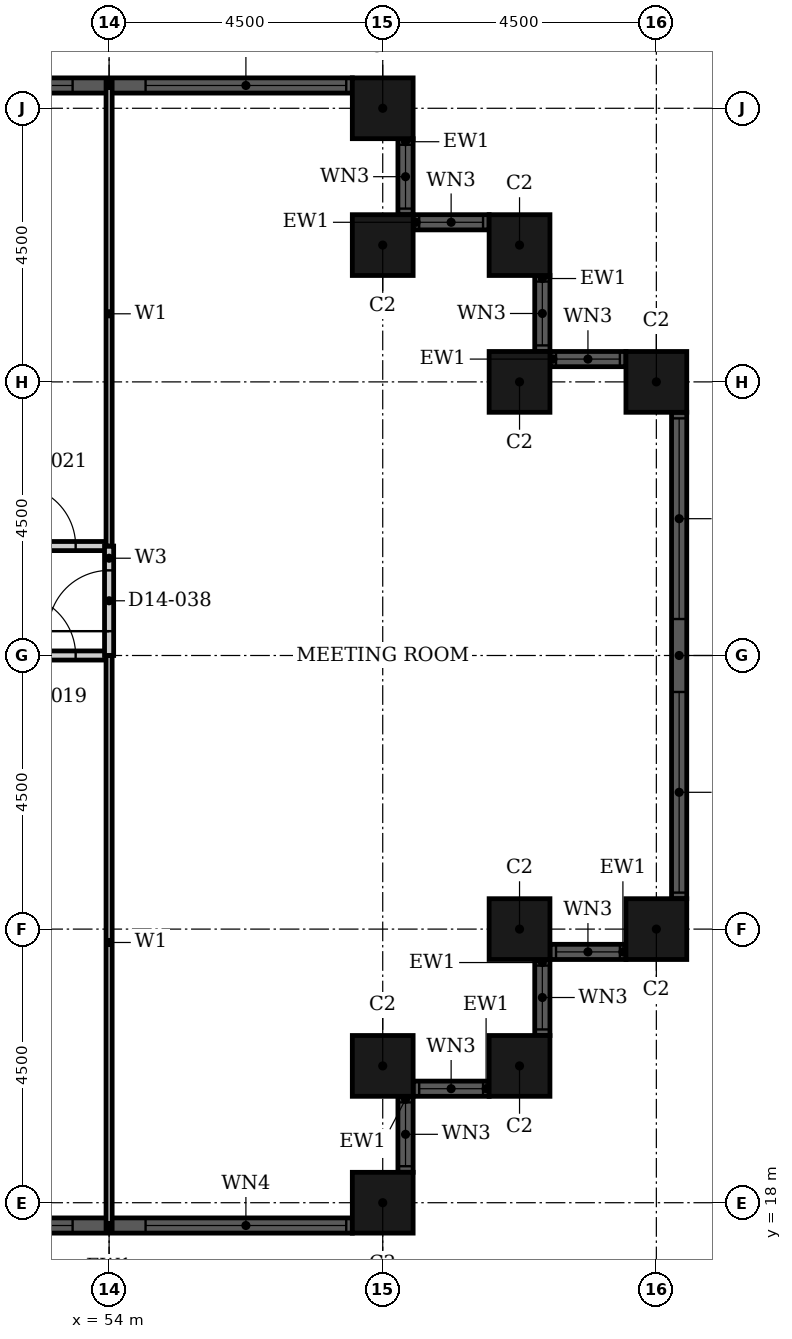
"""IFC4 building model, lengths in metres.
Left out: names, types, materials, properties, quantities, classifications, styles, units other than length and angle.
Written with IfcOpenShell. Run it as: python <this file> out.ifc"""

import sys

from ifc_helpers import new_model, si_unit, direction, frame, frame_2d, origin, origin_2d, place, context, subcontext, project, spatial, rectangle, hollow_rectangle, extrude, element, fill, save


model = new_model("IFC4")
c1 = context("Model", 3, precision=1e-05, world=origin(), true_north=direction((0.0, 1.0)))
c2 = subcontext(c1, "Body", "Model", "MODEL_VIEW")
j1 = project(units=[si_unit("LENGTHUNIT", "METRE"), si_unit("PLANEANGLEUNIT", "RADIAN")], contexts=[c1])
p1 = place(None, origin())
s1 = spatial("IfcSite", under=j1, at=p1, CompositionType="ELEMENT")
p2 = place(p1, origin())
s2 = spatial("IfcBuilding", under=s1, at=p2, CompositionType="ELEMENT")
p3 = place(p2, frame((0.0, 0.0, 63.6)))
s3 = spatial("IfcBuildingStorey", under=s2, at=p3, CompositionType="ELEMENT", Elevation=63.6)
for number, where, z_axis, x_axis in (
    (1, (58.5, 18.0, 0.0), (0.0, 0.0, 1.0), (1.0, 0.0, 0.0)),
    (2, (58.5, 20.25, 0.0), (0.0, 0.0, 1.0), (1.0, 0.0, 0.0)),
    (3, (60.75, 20.25, 0.0), (0.0, 0.0, 1.0), (1.0, 0.0, 0.0)),
    (4, (60.75, 22.5, 0.0), (0.0, 0.0, 1.0), (1.0, 0.0, 0.0)),
    (5, (63.0, 22.5, 0.0), (0.0, 0.0, 1.0), (1.0, 0.0, 0.0)),
    (6, (63.0, 31.5, 0.0), (0.0, 0.0, 1.0), (1.0, 0.0, 0.0)),
    (7, (60.75, 31.5, 0.0), (0.0, 0.0, 1.0), (1.0, 0.0, 0.0)),
    (8, (60.75, 33.75, 0.0), (0.0, 0.0, 1.0), (1.0, 0.0, 0.0)),
    (9, (58.5, 33.75, 0.0), (0.0, 0.0, 1.0), (1.0, 0.0, 0.0)),
    (10, (58.5, 36.0, 0.0), (0.0, 0.0, 1.0), (1.0, 0.0, 0.0)),
):
    element("IfcColumn", number, at=place(p3, frame(where, z_axis=z_axis, x_axis=x_axis)), inside=s3, PredefinedType="COLUMN", context=c2, shape_type="SweptSolid", body=[
        extrude(hollow_rectangle(XDim=1.0, YDim=1.0, WallThickness=0.032, at=origin_2d()), origin(), (0.0, 0.0, 1.0), 3.6),
    ])
p4 = place(p3, frame((50.0, 17.625, 0.0), z_axis=(0.0, 0.0, 1.0), x_axis=(1.0, 0.0, 0.0)))
e11 = element("IfcWall", 11, at=p4, inside=s3, PredefinedType="SOLIDWALL", context=c2, shape_type="SweptSolid", body=[
    extrude(rectangle(XDim=8.0, YDim=0.25, at=frame_2d((4.0, 0.0))), origin(), (0.0, 0.0, 1.0), 3.6),
])
p5 = place(p4, frame((0.1, 0.0, 0.9)))
e12 = element("IfcOpeningElement", 12, at=p5, cuts=e11, PredefinedType="OPENING", context=c2, shape_type="SweptSolid", body=[
    extrude(rectangle(XDim=3.3, YDim=2.08, at=frame_2d((1.65, 1.04))), frame((0.0, 0.135, 0.0), z_axis=(0.0, -1.0, 0.0), x_axis=(1.0, 0.0, 0.0)), (0.0, 0.0, 1.0), 0.27),
])
p6 = place(p4, frame((4.6, 0.0, 0.9)))
e13 = element("IfcOpeningElement", 13, at=p6, cuts=e11, PredefinedType="OPENING", context=c2, shape_type="SweptSolid", body=[
    extrude(rectangle(XDim=3.3, YDim=2.08, at=frame_2d((1.65, 1.04))), frame((0.0, 0.135, 0.0), z_axis=(0.0, -1.0, 0.0), x_axis=(1.0, 0.0, 0.0)), (0.0, 0.0, 1.0), 0.27),
])
p7 = place(p3, frame((58.875, 18.5, 0.0), z_axis=(0.0, 0.0, 1.0), x_axis=(0.0, 1.0, 0.0)))
e14 = element("IfcWall", 14, at=p7, inside=s3, PredefinedType="SOLIDWALL", context=c2, shape_type="SweptSolid", body=[
    extrude(rectangle(XDim=1.25, YDim=0.25, at=frame_2d((0.625, 0.0))), origin(), (0.0, 0.0, 1.0), 3.6),
])
p8 = place(p7, frame((0.1, 0.0, 0.9)))
e15 = element("IfcOpeningElement", 15, at=p8, cuts=e14, PredefinedType="OPENING", context=c2, shape_type="SweptSolid", body=[
    extrude(rectangle(XDim=1.05, YDim=2.08, at=frame_2d((0.525, 1.04))), frame((0.0, 0.135, 0.0), z_axis=(0.0, -1.0, 0.0), x_axis=(1.0, 0.0, 0.0)), (0.0, 0.0, 1.0), 0.27),
])
p9 = place(p3, frame((59.0, 19.875, 0.0), z_axis=(0.0, 0.0, 1.0), x_axis=(1.0, 0.0, 0.0)))
e16 = element("IfcWall", 16, at=p9, inside=s3, PredefinedType="SOLIDWALL", context=c2, shape_type="SweptSolid", body=[
    extrude(rectangle(XDim=1.25, YDim=0.25, at=frame_2d((0.625, 0.0))), origin(), (0.0, 0.0, 1.0), 3.6),
])
p10 = place(p9, frame((0.1, 0.0, 0.9)))
e17 = element("IfcOpeningElement", 17, at=p10, cuts=e16, PredefinedType="OPENING", context=c2, shape_type="SweptSolid", body=[
    extrude(rectangle(XDim=1.05, YDim=2.08, at=frame_2d((0.525, 1.04))), frame((0.0, 0.135, 0.0), z_axis=(0.0, -1.0, 0.0), x_axis=(1.0, 0.0, 0.0)), (0.0, 0.0, 1.0), 0.27),
])
p11 = place(p3, frame((61.125, 20.75, 0.0), z_axis=(0.0, 0.0, 1.0), x_axis=(0.0, 1.0, 0.0)))
e18 = element("IfcWall", 18, at=p11, inside=s3, PredefinedType="SOLIDWALL", context=c2, shape_type="SweptSolid", body=[
    extrude(rectangle(XDim=1.25, YDim=0.25, at=frame_2d((0.625, 0.0))), origin(), (0.0, 0.0, 1.0), 3.6),
])
p12 = place(p11, frame((0.1, 0.0, 0.9)))
e19 = element("IfcOpeningElement", 19, at=p12, cuts=e18, PredefinedType="OPENING", context=c2, shape_type="SweptSolid", body=[
    extrude(rectangle(XDim=1.05, YDim=2.08, at=frame_2d((0.525, 1.04))), frame((0.0, 0.135, 0.0), z_axis=(0.0, -1.0, 0.0), x_axis=(1.0, 0.0, 0.0)), (0.0, 0.0, 1.0), 0.27),
])
p13 = place(p3, frame((61.25, 22.125, 0.0), z_axis=(0.0, 0.0, 1.0), x_axis=(1.0, 0.0, 0.0)))
e20 = element("IfcWall", 20, at=p13, inside=s3, PredefinedType="SOLIDWALL", context=c2, shape_type="SweptSolid", body=[
    extrude(rectangle(XDim=1.25, YDim=0.25, at=frame_2d((0.625, 0.0))), origin(), (0.0, 0.0, 1.0), 3.6),
])
p14 = place(p13, frame((0.1, 0.0, 0.9)))
e21 = element("IfcOpeningElement", 21, at=p14, cuts=e20, PredefinedType="OPENING", context=c2, shape_type="SweptSolid", body=[
    extrude(rectangle(XDim=1.05, YDim=2.08, at=frame_2d((0.525, 1.04))), frame((0.0, 0.135, 0.0), z_axis=(0.0, -1.0, 0.0), x_axis=(1.0, 0.0, 0.0)), (0.0, 0.0, 1.0), 0.27),
])
p15 = place(p3, frame((63.375, 23.0, 0.0), z_axis=(0.0, 0.0, 1.0), x_axis=(0.0, 1.0, 0.0)))
e22 = element("IfcWall", 22, at=p15, inside=s3, PredefinedType="SOLIDWALL", context=c2, shape_type="SweptSolid", body=[
    extrude(rectangle(XDim=8.0, YDim=0.25, at=frame_2d((4.0, 0.0))), origin(), (0.0, 0.0, 1.0), 3.6),
])
p16 = place(p15, frame((0.1, 0.0, 0.9)))
e23 = element("IfcOpeningElement", 23, at=p16, cuts=e22, PredefinedType="OPENING", context=c2, shape_type="SweptSolid", body=[
    extrude(rectangle(XDim=3.3, YDim=2.08, at=frame_2d((1.65, 1.04))), frame((0.0, 0.135, 0.0), z_axis=(0.0, -1.0, 0.0), x_axis=(1.0, 0.0, 0.0)), (0.0, 0.0, 1.0), 0.27),
])
p17 = place(p15, frame((4.6, 0.0, 0.9)))
e24 = element("IfcOpeningElement", 24, at=p17, cuts=e22, PredefinedType="OPENING", context=c2, shape_type="SweptSolid", body=[
    extrude(rectangle(XDim=3.3, YDim=2.08, at=frame_2d((1.65, 1.04))), frame((0.0, 0.135, 0.0), z_axis=(0.0, -1.0, 0.0), x_axis=(1.0, 0.0, 0.0)), (0.0, 0.0, 1.0), 0.27),
])
p18 = place(p3, frame((62.5, 31.875, 0.0), z_axis=(0.0, 0.0, 1.0), x_axis=(-1.0, 0.0, 0.0)))
e25 = element("IfcWall", 25, at=p18, inside=s3, PredefinedType="SOLIDWALL", context=c2, shape_type="SweptSolid", body=[
    extrude(rectangle(XDim=1.25, YDim=0.25, at=frame_2d((0.625, 0.0))), origin(), (0.0, 0.0, 1.0), 3.6),
])
p19 = place(p18, frame((0.1, 0.0, 0.9)))
e26 = element("IfcOpeningElement", 26, at=p19, cuts=e25, PredefinedType="OPENING", context=c2, shape_type="SweptSolid", body=[
    extrude(rectangle(XDim=1.05, YDim=2.08, at=frame_2d((0.525, 1.04))), frame((0.0, 0.135, 0.0), z_axis=(0.0, -1.0, 0.0), x_axis=(1.0, 0.0, 0.0)), (0.0, 0.0, 1.0), 0.27),
])
p20 = place(p3, frame((61.125, 32.0, 0.0), z_axis=(0.0, 0.0, 1.0), x_axis=(0.0, 1.0, 0.0)))
e27 = element("IfcWall", 27, at=p20, inside=s3, PredefinedType="SOLIDWALL", context=c2, shape_type="SweptSolid", body=[
    extrude(rectangle(XDim=1.25, YDim=0.25, at=frame_2d((0.625, 0.0))), origin(), (0.0, 0.0, 1.0), 3.6),
])
p21 = place(p20, frame((0.1, 0.0, 0.9)))
e28 = element("IfcOpeningElement", 28, at=p21, cuts=e27, PredefinedType="OPENING", context=c2, shape_type="SweptSolid", body=[
    extrude(rectangle(XDim=1.05, YDim=2.08, at=frame_2d((0.525, 1.04))), frame((0.0, 0.135, 0.0), z_axis=(0.0, -1.0, 0.0), x_axis=(1.0, 0.0, 0.0)), (0.0, 0.0, 1.0), 0.27),
])
p22 = place(p3, frame((60.25, 34.125, 0.0), z_axis=(0.0, 0.0, 1.0), x_axis=(-1.0, 0.0, 0.0)))
e29 = element("IfcWall", 29, at=p22, inside=s3, PredefinedType="SOLIDWALL", context=c2, shape_type="SweptSolid", body=[
    extrude(rectangle(XDim=1.25, YDim=0.25, at=frame_2d((0.625, 0.0))), origin(), (0.0, 0.0, 1.0), 3.6),
])
p23 = place(p22, frame((0.1, 0.0, 0.9)))
e30 = element("IfcOpeningElement", 30, at=p23, cuts=e29, PredefinedType="OPENING", context=c2, shape_type="SweptSolid", body=[
    extrude(rectangle(XDim=1.05, YDim=2.08, at=frame_2d((0.525, 1.04))), frame((0.0, 0.135, 0.0), z_axis=(0.0, -1.0, 0.0), x_axis=(1.0, 0.0, 0.0)), (0.0, 0.0, 1.0), 0.27),
])
p24 = place(p3, frame((58.875, 34.25, 0.0), z_axis=(0.0, 0.0, 1.0), x_axis=(0.0, 1.0, 0.0)))
e31 = element("IfcWall", 31, at=p24, inside=s3, PredefinedType="SOLIDWALL", context=c2, shape_type="SweptSolid", body=[
    extrude(rectangle(XDim=1.25, YDim=0.25, at=frame_2d((0.625, 0.0))), origin(), (0.0, 0.0, 1.0), 3.6),
])
p25 = place(p24, frame((0.1, 0.0, 0.9)))
e32 = element("IfcOpeningElement", 32, at=p25, cuts=e31, PredefinedType="OPENING", context=c2, shape_type="SweptSolid", body=[
    extrude(rectangle(XDim=1.05, YDim=2.08, at=frame_2d((0.525, 1.04))), frame((0.0, 0.135, 0.0), z_axis=(0.0, -1.0, 0.0), x_axis=(1.0, 0.0, 0.0)), (0.0, 0.0, 1.0), 0.27),
])
p26 = place(p3, frame((58.0, 36.375, 0.0), z_axis=(0.0, 0.0, 1.0), x_axis=(-1.0, 0.0, 0.0)))
e33 = element("IfcWall", 33, at=p26, inside=s3, PredefinedType="SOLIDWALL", context=c2, shape_type="SweptSolid", body=[
    extrude(rectangle(XDim=8.0, YDim=0.25, at=frame_2d((4.0, 0.0))), origin(), (0.0, 0.0, 1.0), 3.6),
])
p27 = place(p26, frame((0.1, 0.0, 0.9)))
e34 = element("IfcOpeningElement", 34, at=p27, cuts=e33, PredefinedType="OPENING", context=c2, shape_type="SweptSolid", body=[
    extrude(rectangle(XDim=3.3, YDim=2.08, at=frame_2d((1.65, 1.04))), frame((0.0, 0.135, 0.0), z_axis=(0.0, -1.0, 0.0), x_axis=(1.0, 0.0, 0.0)), (0.0, 0.0, 1.0), 0.27),
])
p28 = place(p26, frame((4.6, 0.0, 0.9)))
e35 = element("IfcOpeningElement", 35, at=p28, cuts=e33, PredefinedType="OPENING", context=c2, shape_type="SweptSolid", body=[
    extrude(rectangle(XDim=3.3, YDim=2.08, at=frame_2d((1.65, 1.04))), frame((0.0, 0.135, 0.0), z_axis=(0.0, -1.0, 0.0), x_axis=(1.0, 0.0, 0.0)), (0.0, 0.0, 1.0), 0.27),
])
p29 = place(p3, frame((46.8, 27.0, 0.0), z_axis=(0.0, 0.0, 1.0), x_axis=(1.0, 0.0, 0.0)))
e36 = element("IfcWall", 36, at=p29, inside=s3, PredefinedType="PARTITIONING", context=c2, shape_type="SweptSolid", body=[
    extrude(rectangle(XDim=7.2, YDim=0.15, at=frame_2d((3.6, 0.0))), origin(), (0.0, 0.0, 1.0), 2.58),
])
p30 = place(p29, frame((5.65, 0.0, 0.0)))
e37 = element("IfcOpeningElement", 37, at=p30, cuts=e36, PredefinedType="OPENING", context=c2, shape_type="SweptSolid", body=[
    extrude(rectangle(XDim=1.0, YDim=2.1, at=frame_2d((0.5, 1.05))), frame((0.0, 0.085, 0.0), z_axis=(0.0, -1.0, 0.0), x_axis=(1.0, 0.0, 0.0)), (0.0, 0.0, 1.0), 0.17),
])
p31 = place(p3, frame((46.8, 28.8, 0.0), z_axis=(0.0, 0.0, 1.0), x_axis=(1.0, 0.0, 0.0)))
e38 = element("IfcWall", 38, at=p31, inside=s3, PredefinedType="PARTITIONING", context=c2, shape_type="SweptSolid", body=[
    extrude(rectangle(XDim=7.2, YDim=0.15, at=frame_2d((3.6, 0.0))), origin(), (0.0, 0.0, 1.0), 3.3),
])
p32 = place(p31, frame((5.65, 0.0, 0.0)))
e39 = element("IfcOpeningElement", 39, at=p32, cuts=e38, PredefinedType="OPENING", context=c2, shape_type="SweptSolid", body=[
    extrude(rectangle(XDim=1.0, YDim=2.1, at=frame_2d((0.5, 1.05))), frame((0.0, 0.085, 0.0), z_axis=(0.0, -1.0, 0.0), x_axis=(1.0, 0.0, 0.0)), (0.0, 0.0, 1.0), 0.17),
])
p33 = place(p3, frame((54.0, 27.0, 0.0), z_axis=(0.0, 0.0, 1.0), x_axis=(0.0, 1.0, 0.0)))
e40 = element("IfcWall", 40, at=p33, inside=s3, PredefinedType="PARTITIONING", context=c2, shape_type="SweptSolid", body=[
    extrude(rectangle(XDim=1.8, YDim=0.15, at=frame_2d((0.9, 0.0))), origin(), (0.0, 0.0, 1.0), 3.3),
])
p34 = place(p33, frame((0.4, 0.0, 0.0)))
e41 = element("IfcOpeningElement", 41, at=p34, cuts=e40, PredefinedType="OPENING", context=c2, shape_type="SweptSolid", body=[
    extrude(rectangle(XDim=1.0, YDim=2.1, at=frame_2d((0.5, 1.05))), frame((0.0, 0.085, 0.0), z_axis=(0.0, -1.0, 0.0), x_axis=(1.0, 0.0, 0.0)), (0.0, 0.0, 1.0), 0.17),
])
p35 = place(p3, frame((54.0, 28.8, 0.0), z_axis=(0.0, 0.0, 1.0), x_axis=(0.0, 1.0, 0.0)))
e42 = element("IfcWall", 42, at=p35, inside=s3, PredefinedType="PARTITIONING", context=c2, shape_type="SweptSolid", body=[
    extrude(rectangle(XDim=7.64, YDim=0.1, at=frame_2d((3.82, 0.0))), origin(), (0.0, 0.0, 1.0), 3.3),
])
p36 = place(p3, frame((54.0, 17.56, 0.0), z_axis=(0.0, 0.0, 1.0), x_axis=(0.0, 1.0, 0.0)))
e43 = element("IfcWall", 43, at=p36, inside=s3, PredefinedType="PARTITIONING", context=c2, shape_type="SweptSolid", body=[
    extrude(rectangle(XDim=9.44, YDim=0.1, at=frame_2d((4.72, 0.0))), origin(), (0.0, 0.0, 1.0), 3.3),
])
p37 = place(p5, origin())
e44 = element("IfcWindow", 44, at=p37, inside=s3, PartitioningType="SINGLE_PANEL", PredefinedType="WINDOW", context=c2, shape_type="SweptSolid", body=[
    extrude(rectangle(XDim=3.3, YDim=2.08, at=frame_2d((1.65, 1.04))), frame((0.0, 0.03, 0.0), z_axis=(0.0, -1.0, 0.0), x_axis=(1.0, 0.0, 0.0)), (0.0, 0.0, 1.0), 0.06),
])
fill(e12, e44)
p38 = place(p6, origin())
e45 = element("IfcWindow", 45, at=p38, inside=s3, PartitioningType="SINGLE_PANEL", PredefinedType="WINDOW", context=c2, shape_type="SweptSolid", body=[
    extrude(rectangle(XDim=3.3, YDim=2.08, at=frame_2d((1.65, 1.04))), frame((0.0, 0.03, 0.0), z_axis=(0.0, -1.0, 0.0), x_axis=(1.0, 0.0, 0.0)), (0.0, 0.0, 1.0), 0.06),
])
fill(e13, e45)
p39 = place(p8, origin())
e46 = element("IfcWindow", 46, at=p39, inside=s3, PartitioningType="SINGLE_PANEL", PredefinedType="WINDOW", context=c2, shape_type="SweptSolid", body=[
    extrude(rectangle(XDim=1.05, YDim=2.08, at=frame_2d((0.525, 1.04))), frame((0.0, 0.03, 0.0), z_axis=(0.0, -1.0, 0.0), x_axis=(1.0, 0.0, 0.0)), (0.0, 0.0, 1.0), 0.06),
])
fill(e15, e46)
p40 = place(p10, origin())
e47 = element("IfcWindow", 47, at=p40, inside=s3, PartitioningType="SINGLE_PANEL", PredefinedType="WINDOW", context=c2, shape_type="SweptSolid", body=[
    extrude(rectangle(XDim=1.05, YDim=2.08, at=frame_2d((0.525, 1.04))), frame((0.0, 0.03, 0.0), z_axis=(0.0, -1.0, 0.0), x_axis=(1.0, 0.0, 0.0)), (0.0, 0.0, 1.0), 0.06),
])
fill(e17, e47)
p41 = place(p12, origin())
e48 = element("IfcWindow", 48, at=p41, inside=s3, PartitioningType="SINGLE_PANEL", PredefinedType="WINDOW", context=c2, shape_type="SweptSolid", body=[
    extrude(rectangle(XDim=1.05, YDim=2.08, at=frame_2d((0.525, 1.04))), frame((0.0, 0.03, 0.0), z_axis=(0.0, -1.0, 0.0), x_axis=(1.0, 0.0, 0.0)), (0.0, 0.0, 1.0), 0.06),
])
fill(e19, e48)
p42 = place(p14, origin())
e49 = element("IfcWindow", 49, at=p42, inside=s3, PartitioningType="SINGLE_PANEL", PredefinedType="WINDOW", context=c2, shape_type="SweptSolid", body=[
    extrude(rectangle(XDim=1.05, YDim=2.08, at=frame_2d((0.525, 1.04))), frame((0.0, 0.03, 0.0), z_axis=(0.0, -1.0, 0.0), x_axis=(1.0, 0.0, 0.0)), (0.0, 0.0, 1.0), 0.06),
])
fill(e21, e49)
p43 = place(p16, origin())
e50 = element("IfcWindow", 50, at=p43, inside=s3, PartitioningType="SINGLE_PANEL", PredefinedType="WINDOW", context=c2, shape_type="SweptSolid", body=[
    extrude(rectangle(XDim=3.3, YDim=2.08, at=frame_2d((1.65, 1.04))), frame((0.0, 0.03, 0.0), z_axis=(0.0, -1.0, 0.0), x_axis=(1.0, 0.0, 0.0)), (0.0, 0.0, 1.0), 0.06),
])
fill(e23, e50)
p44 = place(p17, origin())
e51 = element("IfcWindow", 51, at=p44, inside=s3, PartitioningType="SINGLE_PANEL", PredefinedType="WINDOW", context=c2, shape_type="SweptSolid", body=[
    extrude(rectangle(XDim=3.3, YDim=2.08, at=frame_2d((1.65, 1.04))), frame((0.0, 0.03, 0.0), z_axis=(0.0, -1.0, 0.0), x_axis=(1.0, 0.0, 0.0)), (0.0, 0.0, 1.0), 0.06),
])
fill(e24, e51)
p45 = place(p19, origin())
e52 = element("IfcWindow", 52, at=p45, inside=s3, PartitioningType="SINGLE_PANEL", PredefinedType="WINDOW", context=c2, shape_type="SweptSolid", body=[
    extrude(rectangle(XDim=1.05, YDim=2.08, at=frame_2d((0.525, 1.04))), frame((0.0, 0.03, 0.0), z_axis=(0.0, -1.0, 0.0), x_axis=(1.0, 0.0, 0.0)), (0.0, 0.0, 1.0), 0.06),
])
fill(e26, e52)
p46 = place(p21, origin())
e53 = element("IfcWindow", 53, at=p46, inside=s3, PartitioningType="SINGLE_PANEL", PredefinedType="WINDOW", context=c2, shape_type="SweptSolid", body=[
    extrude(rectangle(XDim=1.05, YDim=2.08, at=frame_2d((0.525, 1.04))), frame((0.0, 0.03, 0.0), z_axis=(0.0, -1.0, 0.0), x_axis=(1.0, 0.0, 0.0)), (0.0, 0.0, 1.0), 0.06),
])
fill(e28, e53)
p47 = place(p23, origin())
e54 = element("IfcWindow", 54, at=p47, inside=s3, PartitioningType="SINGLE_PANEL", PredefinedType="WINDOW", context=c2, shape_type="SweptSolid", body=[
    extrude(rectangle(XDim=1.05, YDim=2.08, at=frame_2d((0.525, 1.04))), frame((0.0, 0.03, 0.0), z_axis=(0.0, -1.0, 0.0), x_axis=(1.0, 0.0, 0.0)), (0.0, 0.0, 1.0), 0.06),
])
fill(e30, e54)
p48 = place(p25, origin())
e55 = element("IfcWindow", 55, at=p48, inside=s3, PartitioningType="SINGLE_PANEL", PredefinedType="WINDOW", context=c2, shape_type="SweptSolid", body=[
    extrude(rectangle(XDim=1.05, YDim=2.08, at=frame_2d((0.525, 1.04))), frame((0.0, 0.03, 0.0), z_axis=(0.0, -1.0, 0.0), x_axis=(1.0, 0.0, 0.0)), (0.0, 0.0, 1.0), 0.06),
])
fill(e32, e55)
p49 = place(p27, origin())
e56 = element("IfcWindow", 56, at=p49, inside=s3, PartitioningType="SINGLE_PANEL", PredefinedType="WINDOW", context=c2, shape_type="SweptSolid", body=[
    extrude(rectangle(XDim=3.3, YDim=2.08, at=frame_2d((1.65, 1.04))), frame((0.0, 0.03, 0.0), z_axis=(0.0, -1.0, 0.0), x_axis=(1.0, 0.0, 0.0)), (0.0, 0.0, 1.0), 0.06),
])
fill(e34, e56)
p50 = place(p28, origin())
e57 = element("IfcWindow", 57, at=p50, inside=s3, PartitioningType="SINGLE_PANEL", PredefinedType="WINDOW", context=c2, shape_type="SweptSolid", body=[
    extrude(rectangle(XDim=3.3, YDim=2.08, at=frame_2d((1.65, 1.04))), frame((0.0, 0.03, 0.0), z_axis=(0.0, -1.0, 0.0), x_axis=(1.0, 0.0, 0.0)), (0.0, 0.0, 1.0), 0.06),
])
fill(e35, e57)
p51 = place(p30, origin())
e58 = element("IfcDoor", 58, at=p51, inside=s3, OperationType="SINGLE_SWING_RIGHT", PredefinedType="DOOR", context=c2, shape_type="SweptSolid", body=[
    extrude(rectangle(XDim=1.0, YDim=2.1, at=frame_2d((0.5, 1.05))), frame((0.0, 0.025, 0.0), z_axis=(0.0, -1.0, 0.0), x_axis=(1.0, 0.0, 0.0)), (0.0, 0.0, 1.0), 0.05),
])
fill(e37, e58)
p52 = place(p32, origin())
e59 = element("IfcDoor", 59, at=p52, inside=s3, OperationType="SINGLE_SWING_RIGHT", PredefinedType="DOOR", context=c2, shape_type="SweptSolid", body=[
    extrude(rectangle(XDim=1.0, YDim=2.1, at=frame_2d((0.5, 1.05))), frame((0.0, 0.025, 0.0), z_axis=(0.0, -1.0, 0.0), x_axis=(1.0, 0.0, 0.0)), (0.0, 0.0, 1.0), 0.05),
])
fill(e39, e59)
p53 = place(p34, origin())
e60 = element("IfcDoor", 60, at=p53, inside=s3, OperationType="SINGLE_SWING_LEFT", PredefinedType="DOOR", context=c2, shape_type="SweptSolid", body=[
    extrude(rectangle(XDim=1.0, YDim=2.1, at=frame_2d((0.5, 1.05))), frame((0.0, 0.025, 0.0), z_axis=(0.0, -1.0, 0.0), x_axis=(1.0, 0.0, 0.0)), (0.0, 0.0, 1.0), 0.05),
])
fill(e41, e60)
save(model, sys.argv[1])
